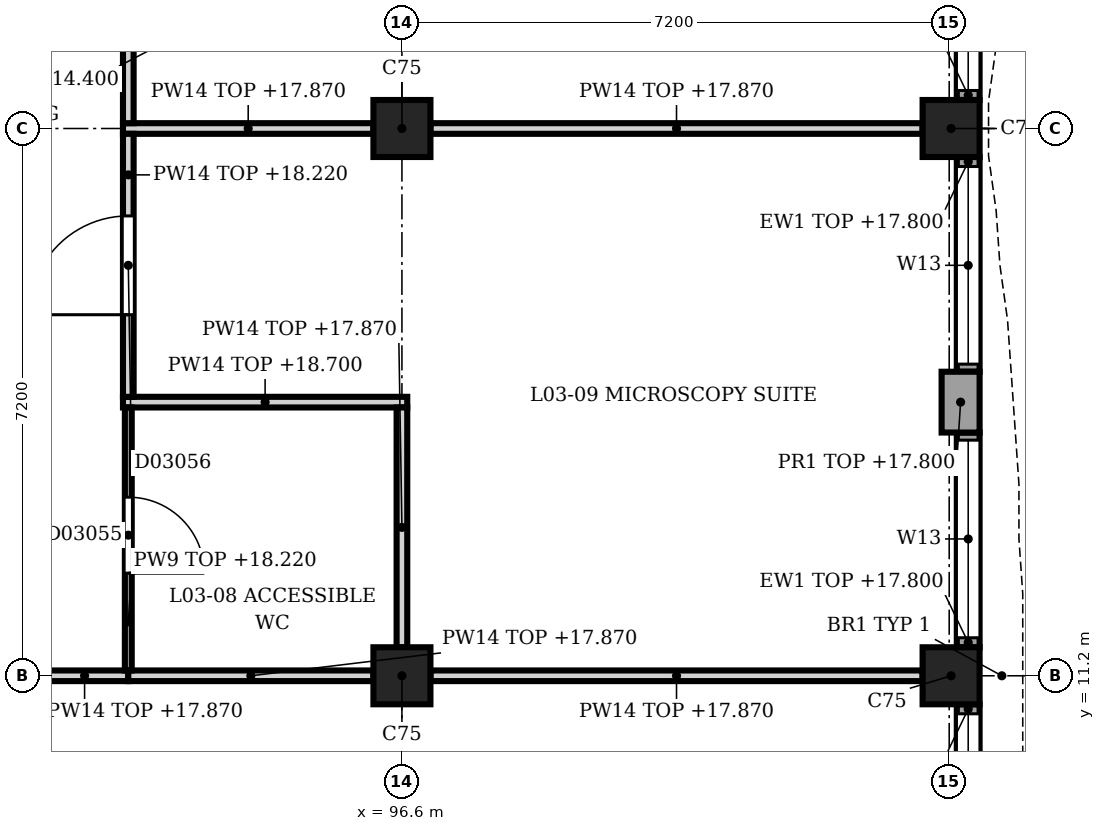
"""IFC4 building model, lengths in metres.
Left out: names, types, materials, properties, quantities, classifications, styles, units other than length and angle.
Written with IfcOpenShell. Run it as: python <this file> out.ifc"""

import sys

from ifc_helpers import new_model, si_unit, direction, frame, frame_2d, origin, origin_2d, place, context, subcontext, project, spatial, rectangle, extrude, element, fill, save


model = new_model("IFC4")
c1 = context("Model", 3, precision=1e-05, world=origin(), true_north=direction((0.0, 1.0)))
c2 = subcontext(c1, "Body", "Model", "MODEL_VIEW")
j1 = project(units=[si_unit("LENGTHUNIT", "METRE"), si_unit("PLANEANGLEUNIT", "RADIAN")], contexts=[c1])
p1 = place(None, origin())
s1 = spatial("IfcSite", under=j1, at=p1, CompositionType="ELEMENT")
p2 = place(p1, origin())
s2 = spatial("IfcBuilding", under=s1, at=p2, CompositionType="ELEMENT")
p3 = place(p2, frame((0.0, 0.0, 14.4)))
s3 = spatial("IfcBuildingStorey", under=s2, at=p3, CompositionType="ELEMENT", Elevation=14.4)
for number, where, z_axis, x_axis in (
    (1, (96.6, 11.2, 0.0), (0.0, 0.0, 1.0), (1.0, 0.0, 0.0)),
    (2, (96.6, 18.4, 0.0), (0.0, 0.0, 1.0), (1.0, 0.0, 0.0)),
    (3, (103.825, 11.2, 0.0), (0.0, 0.0, 1.0), (1.0, 0.0, 0.0)),
    (4, (103.825, 18.4, 0.0), (0.0, 0.0, 1.0), (1.0, 0.0, 0.0)),
):
    element("IfcColumn", number, at=place(p3, frame(where, z_axis=z_axis, x_axis=x_axis)), inside=s3, PredefinedType="COLUMN", context=c2, shape_type="SweptSolid", body=[
        extrude(rectangle(XDim=0.75, YDim=0.75, at=origin_2d()), origin(), (0.0, 0.0, 1.0), 4.5),
    ])
p4 = place(p3, frame((103.95, 15.2, 0.0), z_axis=(0.0, 0.0, 1.0), x_axis=(0.0, -1.0, 0.0)))
e5 = element("IfcWall", 5, at=p4, inside=s3, PredefinedType="SOLIDWALL", context=c2, shape_type="SweptSolid", body=[
    extrude(rectangle(XDim=0.8, YDim=0.5, at=frame_2d((0.4, 0.0))), origin(), (0.0, 0.0, 1.0), 3.4),
])
p5 = place(p3, frame((104.05, 21.6, 0.0), z_axis=(0.0, 0.0, 1.0), x_axis=(0.0, -1.0, 0.0)))
e6 = element("IfcWall", 6, at=p5, inside=s3, PredefinedType="SOLIDWALL", context=c2, shape_type="SweptSolid", body=[
    extrude(rectangle(XDim=2.825, YDim=0.3, at=frame_2d((1.413, 0.0))), origin(), (0.0, 0.0, 1.0), 3.4),
])
p6 = place(p5, frame((0.1, 0.0, 0.9)))
e7 = element("IfcOpeningElement", 7, at=p6, cuts=e6, PredefinedType="OPENING", context=c2, shape_type="SweptSolid", body=[
    extrude(rectangle(XDim=2.6, YDim=2.2, at=frame_2d((1.3, 1.1))), frame((0.0, 0.16, 0.0), z_axis=(0.0, -1.0, 0.0), x_axis=(1.0, 0.0, 0.0)), (0.0, 0.0, 1.0), 0.32),
])
p7 = place(p3, frame((104.05, 18.025, 0.0), z_axis=(0.0, 0.0, 1.0), x_axis=(0.0, -1.0, 0.0)))
e8 = element("IfcWall", 8, at=p7, inside=s3, PredefinedType="SOLIDWALL", context=c2, shape_type="SweptSolid", body=[
    extrude(rectangle(XDim=2.825, YDim=0.3, at=frame_2d((1.413, 0.0))), origin(), (0.0, 0.0, 1.0), 3.4),
])
p8 = place(p7, frame((0.125, 0.0, 0.9)))
e9 = element("IfcOpeningElement", 9, at=p8, cuts=e8, PredefinedType="OPENING", context=c2, shape_type="SweptSolid", body=[
    extrude(rectangle(XDim=2.6, YDim=2.2, at=frame_2d((1.3, 1.1))), frame((0.0, 0.16, 0.0), z_axis=(0.0, -1.0, 0.0), x_axis=(1.0, 0.0, 0.0)), (0.0, 0.0, 1.0), 0.32),
])
p9 = place(p3, frame((104.05, 14.4, 0.0), z_axis=(0.0, 0.0, 1.0), x_axis=(0.0, -1.0, 0.0)))
e10 = element("IfcWall", 10, at=p9, inside=s3, PredefinedType="SOLIDWALL", context=c2, shape_type="SweptSolid", body=[
    extrude(rectangle(XDim=2.825, YDim=0.3, at=frame_2d((1.413, 0.0))), origin(), (0.0, 0.0, 1.0), 3.4),
])
p10 = place(p9, frame((0.1, 0.0, 0.9)))
e11 = element("IfcOpeningElement", 11, at=p10, cuts=e10, PredefinedType="OPENING", context=c2, shape_type="SweptSolid", body=[
    extrude(rectangle(XDim=2.6, YDim=2.2, at=frame_2d((1.3, 1.1))), frame((0.0, 0.16, 0.0), z_axis=(0.0, -1.0, 0.0), x_axis=(1.0, 0.0, 0.0)), (0.0, 0.0, 1.0), 0.32),
])
p11 = place(p3, frame((104.05, 10.825, 0.0), z_axis=(0.0, 0.0, 1.0), x_axis=(0.0, -1.0, 0.0)))
e12 = element("IfcWall", 12, at=p11, inside=s3, PredefinedType="SOLIDWALL", context=c2, shape_type="SweptSolid", body=[
    extrude(rectangle(XDim=2.825, YDim=0.3, at=frame_2d((1.413, 0.0))), origin(), (0.0, 0.0, 1.0), 3.4),
])
p12 = place(p11, frame((0.125, 0.0, 0.9)))
e13 = element("IfcOpeningElement", 13, at=p12, cuts=e12, PredefinedType="OPENING", context=c2, shape_type="SweptSolid", body=[
    extrude(rectangle(XDim=2.6, YDim=2.2, at=frame_2d((1.3, 1.1))), frame((0.0, 0.16, 0.0), z_axis=(0.0, -1.0, 0.0), x_axis=(1.0, 0.0, 0.0)), (0.0, 0.0, 1.0), 0.32),
])
p13 = place(p3, frame((93.0, 11.2, 0.0), z_axis=(0.0, 0.0, 1.0), x_axis=(-1.0, 0.0, 0.0)))
e14 = element("IfcWall", 14, at=p13, inside=s3, PredefinedType="PARTITIONING", context=c2, shape_type="SweptSolid", body=[
    extrude(rectangle(XDim=3.225, YDim=0.14, at=frame_2d((1.613, 0.0))), origin(), (0.0, 0.0, 1.0), 3.47),
])
p14 = place(p13, frame((1.15, 0.0, 0.0)))
e15 = element("IfcOpeningElement", 15, at=p14, cuts=e14, PredefinedType="OPENING", context=c2, shape_type="SweptSolid", body=[
    extrude(rectangle(XDim=1.2, YDim=2.1, at=frame_2d((0.6, 1.05))), frame((0.0, 0.08, 0.0), z_axis=(0.0, -1.0, 0.0), x_axis=(1.0, 0.0, 0.0)), (0.0, 0.0, 1.0), 0.16),
])
p15 = place(p3, frame((93.0, 11.2, 0.0), z_axis=(0.0, 0.0, 1.0), x_axis=(1.0, 0.0, 0.0)))
e16 = element("IfcWall", 16, at=p15, inside=s3, PredefinedType="PARTITIONING", context=c2, shape_type="SweptSolid", body=[
    extrude(rectangle(XDim=3.225, YDim=0.14, at=frame_2d((1.613, 0.0))), origin(), (0.0, 0.0, 1.0), 3.47),
])
p16 = place(p3, frame((96.975, 11.2, 0.0), z_axis=(0.0, 0.0, 1.0), x_axis=(1.0, 0.0, 0.0)))
e17 = element("IfcWall", 17, at=p16, inside=s3, PredefinedType="PARTITIONING", context=c2, shape_type="SweptSolid", body=[
    extrude(rectangle(XDim=6.475, YDim=0.14, at=frame_2d((3.237, 0.0))), origin(), (0.0, 0.0, 1.0), 3.47),
])
p17 = place(p3, frame((92.93, 14.8, 0.0), z_axis=(0.0, 0.0, 1.0), x_axis=(1.0, 0.0, 0.0)))
e18 = element("IfcWall", 18, at=p17, inside=s3, PredefinedType="PARTITIONING", context=c2, shape_type="SweptSolid", body=[
    extrude(rectangle(XDim=3.74, YDim=0.14, at=frame_2d((1.87, 0.0))), origin(), (0.0, 0.0, 1.0), 4.3),
])
p18 = place(p3, frame((92.93, 18.4, 0.0), z_axis=(0.0, 0.0, 1.0), x_axis=(1.0, 0.0, 0.0)))
e19 = element("IfcWall", 19, at=p18, inside=s3, PredefinedType="PARTITIONING", context=c2, shape_type="SweptSolid", body=[
    extrude(rectangle(XDim=3.295, YDim=0.14, at=frame_2d((1.647, 0.0))), origin(), (0.0, 0.0, 1.0), 3.47),
])
p19 = place(p3, frame((96.975, 18.4, 0.0), z_axis=(0.0, 0.0, 1.0), x_axis=(1.0, 0.0, 0.0)))
e20 = element("IfcWall", 20, at=p19, inside=s3, PredefinedType="PARTITIONING", context=c2, shape_type="SweptSolid", body=[
    extrude(rectangle(XDim=6.475, YDim=0.14, at=frame_2d((3.237, 0.0))), origin(), (0.0, 0.0, 1.0), 3.47),
])
p20 = place(p3, frame((93.0, 14.73, 0.0), z_axis=(0.0, 0.0, 1.0), x_axis=(0.0, -1.0, 0.0)))
e21 = element("IfcWall", 21, at=p20, inside=s3, PredefinedType="PARTITIONING", context=c2, shape_type="SweptSolid", body=[
    extrude(rectangle(XDim=3.46, YDim=0.09, at=frame_2d((1.73, 0.0))), origin(), (0.0, 0.0, 1.0), 3.82),
])
p21 = place(p20, frame((1.18, 0.0, 0.0)))
e22 = element("IfcOpeningElement", 22, at=p21, cuts=e21, PredefinedType="OPENING", context=c2, shape_type="SweptSolid", body=[
    extrude(rectangle(XDim=1.0, YDim=2.2, at=frame_2d((0.5, 1.1))), frame((0.0, 0.055, 0.0), z_axis=(0.0, -1.0, 0.0), x_axis=(1.0, 0.0, 0.0)), (0.0, 0.0, 1.0), 0.11),
])
p22 = place(p3, frame((93.0, 18.33, 0.0), z_axis=(0.0, 0.0, 1.0), x_axis=(0.0, -1.0, 0.0)))
e23 = element("IfcWall", 23, at=p22, inside=s3, PredefinedType="PARTITIONING", context=c2, shape_type="SweptSolid", body=[
    extrude(rectangle(XDim=3.46, YDim=0.14, at=frame_2d((1.73, 0.0))), origin(), (0.0, 0.0, 1.0), 3.82),
])
p23 = place(p22, frame((1.08, 0.0, 0.0)))
e24 = element("IfcOpeningElement", 24, at=p23, cuts=e23, PredefinedType="OPENING", context=c2, shape_type="SweptSolid", body=[
    extrude(rectangle(XDim=1.3, YDim=2.1, at=frame_2d((0.65, 1.05))), frame((0.0, 0.08, 0.0), z_axis=(0.0, -1.0, 0.0), x_axis=(1.0, 0.0, 0.0)), (0.0, 0.0, 1.0), 0.16),
])
p24 = place(p3, frame((93.0, 21.93, 0.0), z_axis=(0.0, 0.0, 1.0), x_axis=(0.0, -1.0, 0.0)))
e25 = element("IfcWall", 25, at=p24, inside=s3, PredefinedType="PARTITIONING", context=c2, shape_type="SweptSolid", body=[
    extrude(rectangle(XDim=3.46, YDim=0.14, at=frame_2d((1.73, 0.0))), origin(), (0.0, 0.0, 1.0), 4.3),
])
p25 = place(p24, frame((1.18, 0.0, 0.0)))
e26 = element("IfcOpeningElement", 26, at=p25, cuts=e25, PredefinedType="OPENING", context=c2, shape_type="SweptSolid", body=[
    extrude(rectangle(XDim=1.2, YDim=2.1, at=frame_2d((0.6, 1.05))), frame((0.0, 0.08, 0.0), z_axis=(0.0, -1.0, 0.0), x_axis=(1.0, 0.0, 0.0)), (0.0, 0.0, 1.0), 0.16),
])
p26 = place(p3, frame((96.6, 11.575, 0.0), z_axis=(0.0, 0.0, 1.0), x_axis=(0.0, 1.0, 0.0)))
e27 = element("IfcWall", 27, at=p26, inside=s3, PredefinedType="PARTITIONING", context=c2, shape_type="SweptSolid", body=[
    extrude(rectangle(XDim=3.155, YDim=0.14, at=frame_2d((1.578, 0.0))), origin(), (0.0, 0.0, 1.0), 3.47),
])
p27 = place(p6, origin())
e28 = element("IfcWindow", 28, at=p27, inside=s3, PartitioningType="SINGLE_PANEL", PredefinedType="WINDOW", context=c2, shape_type="SweptSolid", body=[
    extrude(rectangle(XDim=2.6, YDim=2.2, at=frame_2d((1.3, 1.1))), frame((0.0, 0.03, 0.0), z_axis=(0.0, -1.0, 0.0), x_axis=(1.0, 0.0, 0.0)), (0.0, 0.0, 1.0), 0.06),
])
fill(e7, e28)
p28 = place(p8, origin())
e29 = element("IfcWindow", 29, at=p28, inside=s3, PartitioningType="SINGLE_PANEL", PredefinedType="WINDOW", context=c2, shape_type="SweptSolid", body=[
    extrude(rectangle(XDim=2.6, YDim=2.2, at=frame_2d((1.3, 1.1))), frame((0.0, 0.03, 0.0), z_axis=(0.0, -1.0, 0.0), x_axis=(1.0, 0.0, 0.0)), (0.0, 0.0, 1.0), 0.06),
])
fill(e9, e29)
p29 = place(p10, origin())
e30 = element("IfcWindow", 30, at=p29, inside=s3, PartitioningType="SINGLE_PANEL", PredefinedType="WINDOW", context=c2, shape_type="SweptSolid", body=[
    extrude(rectangle(XDim=2.6, YDim=2.2, at=frame_2d((1.3, 1.1))), frame((0.0, 0.03, 0.0), z_axis=(0.0, -1.0, 0.0), x_axis=(1.0, 0.0, 0.0)), (0.0, 0.0, 1.0), 0.06),
])
fill(e11, e30)
p30 = place(p12, origin())
e31 = element("IfcWindow", 31, at=p30, inside=s3, PartitioningType="SINGLE_PANEL", PredefinedType="WINDOW", context=c2, shape_type="SweptSolid", body=[
    extrude(rectangle(XDim=2.6, YDim=2.2, at=frame_2d((1.3, 1.1))), frame((0.0, 0.03, 0.0), z_axis=(0.0, -1.0, 0.0), x_axis=(1.0, 0.0, 0.0)), (0.0, 0.0, 1.0), 0.06),
])
fill(e13, e31)
p31 = place(p21, origin())
e32 = element("IfcDoor", 32, at=p31, inside=s3, OperationType="SINGLE_SWING_LEFT", PredefinedType="DOOR", context=c2, shape_type="SweptSolid", body=[
    extrude(rectangle(XDim=1.0, YDim=2.2, at=frame_2d((0.5, 1.1))), frame((0.0, 0.025, 0.0), z_axis=(0.0, -1.0, 0.0), x_axis=(1.0, 0.0, 0.0)), (0.0, 0.0, 1.0), 0.05),
])
fill(e22, e32)
p32 = place(p23, origin())
e33 = element("IfcDoor", 33, at=p32, inside=s3, OperationType="SINGLE_SWING_LEFT", PredefinedType="DOOR", context=c2, shape_type="SweptSolid", body=[
    extrude(rectangle(XDim=1.3, YDim=2.1, at=frame_2d((0.65, 1.05))), frame((0.0, 0.025, 0.0), z_axis=(0.0, -1.0, 0.0), x_axis=(1.0, 0.0, 0.0)), (0.0, 0.0, 1.0), 0.05),
])
fill(e24, e33)
save(model, sys.argv[1])
